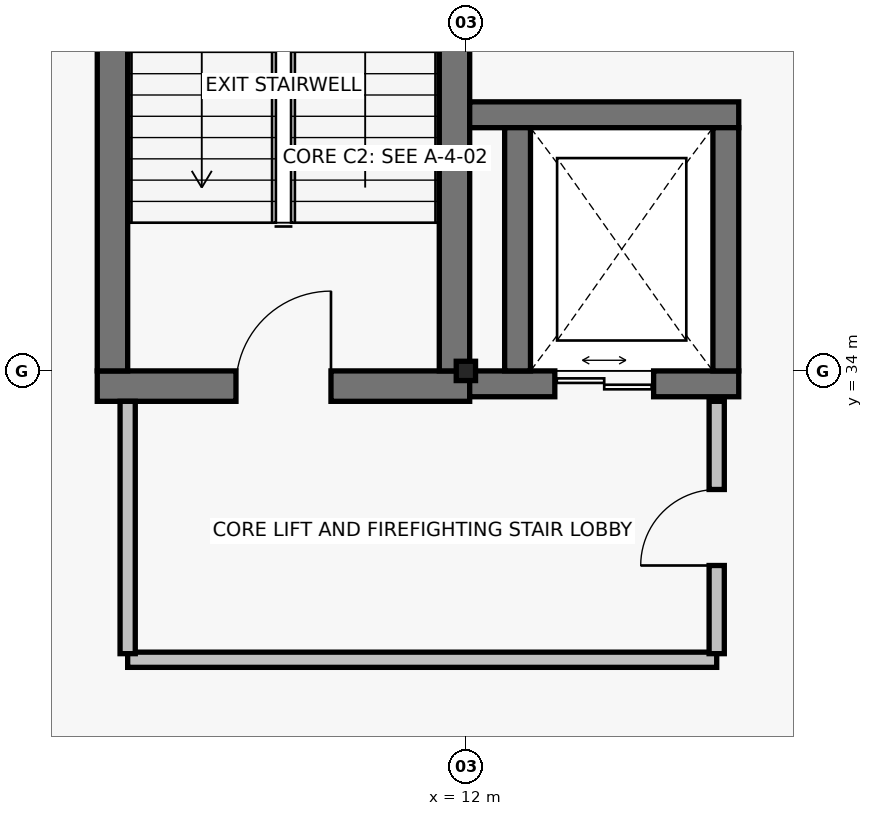
"""IFC4 building model, lengths in metres.
Left out: names, types, materials, properties, quantities, classifications, styles, units other than length and angle.
Written with IfcOpenShell. Run it as: python <this file> out.ifc"""

import sys

from ifc_helpers import new_model, si_unit, direction, frame, frame_2d, origin, origin_2d, place, context, subcontext, project, spatial, rectangle, hollow_rectangle, extrude, element, fill, save


model = new_model("IFC4")
c1 = context("Model", 3, precision=1e-05, world=origin(), true_north=direction((0.0, 1.0)))
c2 = subcontext(c1, "Body", "Model", "MODEL_VIEW")
j1 = project(units=[si_unit("LENGTHUNIT", "METRE"), si_unit("PLANEANGLEUNIT", "RADIAN")], contexts=[c1])
p1 = place(None, origin())
s1 = spatial("IfcSite", under=j1, at=p1, CompositionType="ELEMENT")
p2 = place(p1, origin())
s2 = spatial("IfcBuilding", under=s1, at=p2, CompositionType="ELEMENT")
p3 = place(p2, frame((0.0, 0.0, 15.4)))
s3 = spatial("IfcBuildingStorey", under=s2, at=p3, CompositionType="ELEMENT", Elevation=15.4)
p4 = place(p3, frame((12.0, 34.0, 0.0), z_axis=(0.0, 0.0, 1.0), x_axis=(1.0, 0.0, 0.0)))
e1 = element("IfcColumn", 1, at=p4, inside=s3, PredefinedType="COLUMN", context=c2, shape_type="SweptSolid", body=[
    extrude(hollow_rectangle(XDim=0.254, YDim=0.254, WallThickness=0.01, InnerFilletRadius=0.01, OuterFilletRadius=0.019, at=origin_2d()), origin(), (0.0, 0.0, 1.0), 4.0),
])
p5 = place(p3, frame((7.15, 33.8, 0.0), z_axis=(0.0, 0.0, 1.0), x_axis=(1.0, 0.0, 0.0)))
e2 = element("IfcWall", 2, at=p5, inside=s3, PredefinedType="SHEAR", context=c2, shape_type="SweptSolid", body=[
    extrude(rectangle(XDim=4.9, YDim=0.4, at=frame_2d((2.45, 0.0))), origin(), (0.0, 0.0, 1.0), 3.7),
])
p6 = place(p5, frame((1.825, 0.0, 0.0)))
e3 = element("IfcOpeningElement", 3, at=p6, cuts=e2, PredefinedType="OPENING", context=c2, shape_type="SweptSolid", body=[
    extrude(rectangle(XDim=1.25, YDim=2.2, at=frame_2d((0.625, 1.1))), frame((0.0, 0.215, 0.0), z_axis=(0.0, -1.0, 0.0), x_axis=(1.0, 0.0, 0.0)), (0.0, 0.0, 1.0), 0.43),
])
for number, where, z_axis, x_axis in (
    (4, (7.35, 43.4, 0.0), (0.0, 0.0, 1.0), (0.0, -1.0, 0.0)),
    (5, (11.85, 34.0, 0.0), (0.0, 0.0, 1.0), (0.0, 1.0, 0.0)),
):
    element("IfcWall", number, at=place(p3, frame(where, z_axis=z_axis, x_axis=x_axis)), inside=s3, PredefinedType="SHEAR", context=c2, shape_type="SweptSolid", body=[
        extrude(rectangle(XDim=9.4, YDim=0.4, at=frame_2d((4.7, 0.0))), origin(), (0.0, 0.0, 1.0), 3.7),
    ])
p7 = place(p3, frame((12.05, 33.83, 0.0), z_axis=(0.0, 0.0, 1.0), x_axis=(1.0, 0.0, 0.0)))
e6 = element("IfcWall", 6, at=p7, inside=s3, PredefinedType="SHEAR", context=c2, shape_type="SweptSolid", body=[
    extrude(rectangle(XDim=3.54, YDim=0.34, at=frame_2d((1.77, 0.0))), origin(), (0.0, 0.0, 1.0), 3.7),
])
p8 = place(p7, frame((1.12, 0.0, 0.0)))
e7 = element("IfcOpeningElement", 7, at=p8, cuts=e6, PredefinedType="OPENING", context=c2, shape_type="SweptSolid", body=[
    extrude(rectangle(XDim=1.3, YDim=2.25, at=frame_2d((0.65, 1.125))), frame((0.0, 0.185, 0.0), z_axis=(0.0, -1.0, 0.0), x_axis=(1.0, 0.0, 0.0)), (0.0, 0.0, 1.0), 0.37),
])
p9 = place(p3, frame((15.59, 37.37, 0.0), z_axis=(0.0, 0.0, 1.0), x_axis=(-1.0, 0.0, 0.0)))
e8 = element("IfcWall", 8, at=p9, inside=s3, PredefinedType="SHEAR", context=c2, shape_type="SweptSolid", body=[
    extrude(rectangle(XDim=3.54, YDim=0.34, at=frame_2d((1.77, 0.0))), origin(), (0.0, 0.0, 1.0), 3.7),
])
for number, where, z_axis, x_axis in (
    (9, (12.68, 37.2, 0.0), (0.0, 0.0, 1.0), (0.0, -1.0, 0.0)),
    (10, (15.42, 34.0, 0.0), (0.0, 0.0, 1.0), (0.0, 1.0, 0.0)),
):
    element("IfcWall", number, at=place(p3, frame(where, z_axis=z_axis, x_axis=x_axis)), inside=s3, PredefinedType="SHEAR", context=c2, shape_type="SweptSolid", body=[
        extrude(rectangle(XDim=3.2, YDim=0.34, at=frame_2d((1.6, 0.0))), origin(), (0.0, 0.0, 1.0), 3.7),
    ])
p10 = place(p3, frame((7.55, 30.2, 0.0), z_axis=(0.0, 0.0, 1.0), x_axis=(1.0, 0.0, 0.0)))
e11 = element("IfcWall", 11, at=p10, inside=s3, PredefinedType="PARTITIONING", context=c2, shape_type="SweptSolid", body=[
    extrude(rectangle(XDim=7.75, YDim=0.2, at=frame_2d((3.875, 0.0))), origin(), (0.0, 0.0, 1.0), 3.24),
])
p11 = place(p3, frame((7.55, 33.6, 0.0), z_axis=(0.0, 0.0, 1.0), x_axis=(0.0, -1.0, 0.0)))
e12 = element("IfcWall", 12, at=p11, inside=s3, PredefinedType="PARTITIONING", context=c2, shape_type="SweptSolid", body=[
    extrude(rectangle(XDim=3.32, YDim=0.2, at=frame_2d((1.66, 0.0))), origin(), (0.0, 0.0, 1.0), 3.68),
])
p12 = place(p3, frame((15.3, 30.28, 0.0), z_axis=(0.0, 0.0, 1.0), x_axis=(0.0, 1.0, 0.0)))
e13 = element("IfcWall", 13, at=p12, inside=s3, PredefinedType="PARTITIONING", context=c2, shape_type="SweptSolid", body=[
    extrude(rectangle(XDim=3.32, YDim=0.2, at=frame_2d((1.66, 0.0))), origin(), (0.0, 0.0, 1.0), 3.68),
])
p13 = place(p12, frame((1.16, 0.0, 0.0)))
e14 = element("IfcOpeningElement", 14, at=p13, cuts=e13, PredefinedType="OPENING", context=c2, shape_type="SweptSolid", body=[
    extrude(rectangle(XDim=1.0, YDim=2.15, at=frame_2d((0.5, 1.075))), frame((0.0, 0.115, 0.0), z_axis=(0.0, -1.0, 0.0), x_axis=(1.0, 0.0, 0.0)), (0.0, 0.0, 1.0), 0.23),
])
p14 = place(p6, origin())
e15 = element("IfcDoor", 15, at=p14, inside=s3, OperationType="SINGLE_SWING_RIGHT", PredefinedType="DOOR", context=c2, shape_type="SweptSolid", body=[
    extrude(rectangle(XDim=1.25, YDim=2.2, at=frame_2d((0.625, 1.1))), frame((0.0, 0.025, 0.0), z_axis=(0.0, -1.0, 0.0), x_axis=(1.0, 0.0, 0.0)), (0.0, 0.0, 1.0), 0.05),
])
fill(e3, e15)
p15 = place(p8, origin())
e16 = element("IfcDoor", 16, at=p15, inside=s3, OperationType="DOUBLE_DOOR_SLIDING", PredefinedType="DOOR", context=c2, shape_type="SweptSolid", body=[
    extrude(rectangle(XDim=1.3, YDim=2.25, at=frame_2d((0.65, 1.125))), frame((0.0, 0.025, 0.0), z_axis=(0.0, -1.0, 0.0), x_axis=(1.0, 0.0, 0.0)), (0.0, 0.0, 1.0), 0.05),
])
fill(e7, e16)
p16 = place(p13, origin())
e17 = element("IfcDoor", 17, at=p16, inside=s3, OperationType="SINGLE_SWING_LEFT", PredefinedType="DOOR", context=c2, shape_type="SweptSolid", body=[
    extrude(rectangle(XDim=1.0, YDim=2.15, at=frame_2d((0.5, 1.075))), frame((0.0, 0.025, 0.0), z_axis=(0.0, -1.0, 0.0), x_axis=(1.0, 0.0, 0.0)), (0.0, 0.0, 1.0), 0.05),
])
fill(e14, e17)
save(model, sys.argv[1])
